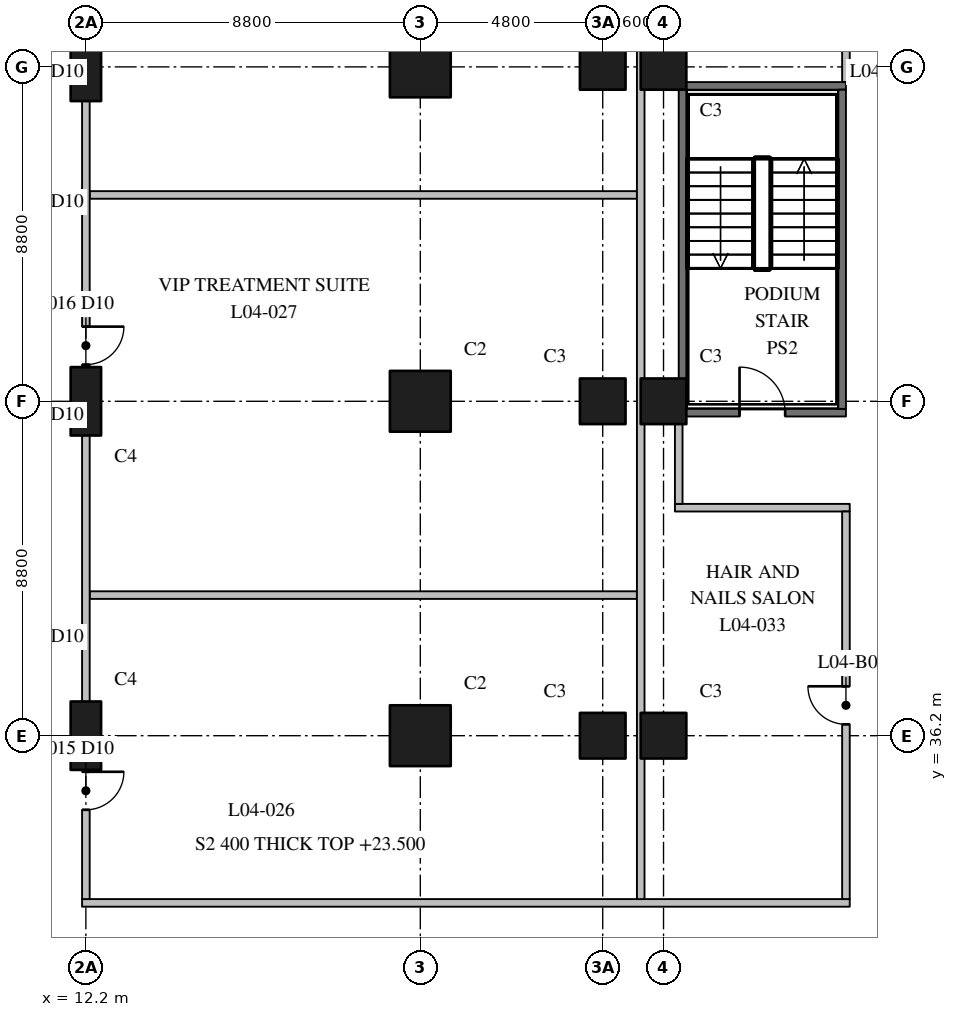
"""IFC4 building model, lengths in metres.
Left out: names, types, materials, properties, quantities, classifications, styles, units other than length and angle.
Written with IfcOpenShell. Run it as: python <this file> out.ifc"""

import sys

from ifc_helpers import new_model, si_unit, direction, frame, frame_2d, origin, origin_2d, place, context, subcontext, project, spatial, rectangle, extrude, element, fill, save


model = new_model("IFC4")
c1 = context("Model", 3, precision=1e-05, world=origin(), true_north=direction((0.0, 1.0)))
c2 = subcontext(c1, "Body", "Model", "MODEL_VIEW")
j1 = project(units=[si_unit("LENGTHUNIT", "METRE"), si_unit("PLANEANGLEUNIT", "RADIAN")], contexts=[c1])
p1 = place(None, origin())
s1 = spatial("IfcSite", under=j1, at=p1, CompositionType="ELEMENT")
p2 = place(p1, origin())
s2 = spatial("IfcBuilding", under=s1, at=p2, CompositionType="ELEMENT")
p3 = place(p2, frame((0.0, 0.0, 23.5)))
s3 = spatial("IfcBuildingStorey", under=s2, at=p3, CompositionType="ELEMENT", Elevation=23.5)
for number, where, z_axis, x_axis in (
    (1, (12.2, 36.2, 0.0), (0.0, 0.0, 1.0), (0.0, 1.0, 0.0)),
    (2, (12.2, 45.0, 0.0), (0.0, 0.0, 1.0), (0.0, 1.0, 0.0)),
    (3, (12.2, 53.8, 0.0), (0.0, 0.0, 1.0), (0.0, 1.0, 0.0)),
):
    element("IfcColumn", number, at=place(p3, frame(where, z_axis=z_axis, x_axis=x_axis)), inside=s3, PredefinedType="COLUMN", context=c2, shape_type="SweptSolid", body=[
        extrude(rectangle(XDim=1.8, YDim=0.8, at=origin_2d()), origin(), (0.0, 0.0, 1.0), 5.5),
    ])
for number, where, z_axis, x_axis in (
    (4, (21.0, 36.2, 0.0), (0.0, 0.0, 1.0), (1.0, 0.0, 0.0)),
    (5, (21.0, 45.0, 0.0), (0.0, 0.0, 1.0), (1.0, 0.0, 0.0)),
    (6, (21.0, 53.8, 0.0), (0.0, 0.0, 1.0), (1.0, 0.0, 0.0)),
):
    element("IfcColumn", number, at=place(p3, frame(where, z_axis=z_axis, x_axis=x_axis)), inside=s3, PredefinedType="COLUMN", context=c2, shape_type="SweptSolid", body=[
        extrude(rectangle(XDim=1.6, YDim=1.6, at=origin_2d()), origin(), (0.0, 0.0, 1.0), 5.5),
    ])
for number, where, z_axis, x_axis in (
    (7, (25.8, 36.2, 0.0), (0.0, 0.0, 1.0), (1.0, 0.0, 0.0)),
    (8, (25.8, 45.0, 0.0), (0.0, 0.0, 1.0), (1.0, 0.0, 0.0)),
    (9, (25.8, 53.8, 0.0), (0.0, 0.0, 1.0), (1.0, 0.0, 0.0)),
    (10, (27.4, 36.2, 0.0), (0.0, 0.0, 1.0), (1.0, 0.0, 0.0)),
    (11, (27.4, 45.0, 0.0), (0.0, 0.0, 1.0), (1.0, 0.0, 0.0)),
    (12, (27.4, 53.8, 0.0), (0.0, 0.0, 1.0), (1.0, 0.0, 0.0)),
):
    element("IfcColumn", number, at=place(p3, frame(where, z_axis=z_axis, x_axis=x_axis)), inside=s3, PredefinedType="COLUMN", context=c2, shape_type="SweptSolid", body=[
        extrude(rectangle(XDim=1.2, YDim=1.2, at=origin_2d()), origin(), (0.0, 0.0, 1.0), 5.5),
    ])
p4 = place(p3, frame((27.8, 44.7, 0.0), z_axis=(0.0, 0.0, 1.0), x_axis=(1.0, 0.0, 0.0)))
e13 = element("IfcWall", 13, at=p4, inside=s3, PredefinedType="SHEAR", context=c2, shape_type="SweptSolid", body=[
    extrude(rectangle(XDim=4.4, YDim=0.2, at=frame_2d((2.2, 0.0))), origin(), (0.0, 0.0, 1.0), 5.1),
])
p5 = place(p4, frame((1.6, 0.0, 0.0)))
e14 = element("IfcOpeningElement", 14, at=p5, cuts=e13, PredefinedType="OPENING", context=c2, shape_type="SweptSolid", body=[
    extrude(rectangle(XDim=1.2, YDim=2.1, at=frame_2d((0.6, 1.05))), frame((0.0, 0.11, 0.0), z_axis=(0.0, -1.0, 0.0), x_axis=(1.0, 0.0, 0.0)), (0.0, 0.0, 1.0), 0.22),
])
p6 = place(p3, frame((27.8, 53.3, 0.0), z_axis=(0.0, 0.0, 1.0), x_axis=(1.0, 0.0, 0.0)))
e15 = element("IfcWall", 15, at=p6, inside=s3, PredefinedType="SHEAR", context=c2, shape_type="SweptSolid", body=[
    extrude(rectangle(XDim=4.4, YDim=0.2, at=frame_2d((2.2, 0.0))), origin(), (0.0, 0.0, 1.0), 5.1),
])
for number, where, z_axis, x_axis in (
    (16, (27.9, 44.8, 0.0), (0.0, 0.0, 1.0), (0.0, 1.0, 0.0)),
    (17, (32.1, 44.8, 0.0), (0.0, 0.0, 1.0), (0.0, 1.0, 0.0)),
):
    element("IfcWall", number, at=place(p3, frame(where, z_axis=z_axis, x_axis=x_axis)), inside=s3, PredefinedType="SHEAR", context=c2, shape_type="SweptSolid", body=[
        extrude(rectangle(XDim=8.4, YDim=0.2, at=frame_2d((4.2, 0.0))), origin(), (0.0, 0.0, 1.0), 5.1),
    ])
p7 = place(p3, frame((12.1, 31.8, 0.0), z_axis=(0.0, 0.0, 1.0), x_axis=(1.0, 0.0, 0.0)))
e18 = element("IfcWall", 18, at=p7, inside=s3, PredefinedType="PARTITIONING", context=c2, shape_type="SweptSolid", body=[
    extrude(rectangle(XDim=20.2, YDim=0.2, at=frame_2d((10.1, 0.0))), origin(), (0.0, 0.0, 1.0), 5.1),
])
p8 = place(p3, frame((27.7, 42.2, 0.0), z_axis=(0.0, 0.0, 1.0), x_axis=(1.0, 0.0, 0.0)))
e19 = element("IfcWall", 19, at=p8, inside=s3, PredefinedType="PARTITIONING", context=c2, shape_type="SweptSolid", body=[
    extrude(rectangle(XDim=4.6, YDim=0.2, at=frame_2d((2.3, 0.0))), origin(), (0.0, 0.0, 1.0), 5.1),
])
for number, where, z_axis, x_axis in (
    (20, (12.3, 39.9, 0.0), (0.0, 0.0, 1.0), (1.0, 0.0, 0.0)),
    (21, (12.3, 50.43, 0.0), (0.0, 0.0, 1.0), (1.0, 0.0, 0.0)),
):
    element("IfcWall", number, at=place(p3, frame(where, z_axis=z_axis, x_axis=x_axis)), inside=s3, PredefinedType="PARTITIONING", context=c2, shape_type="SweptSolid", body=[
        extrude(rectangle(XDim=14.4, YDim=0.2, at=frame_2d((7.2, 0.0))), origin(), (0.0, 0.0, 1.0), 5.1),
    ])
p9 = place(p3, frame((12.2, 31.9, 0.0), z_axis=(0.0, 0.0, 1.0), x_axis=(0.0, 1.0, 0.0)))
e22 = element("IfcWall", 22, at=p9, inside=s3, PredefinedType="PARTITIONING", context=c2, shape_type="SweptSolid", body=[
    extrude(rectangle(XDim=46.3, YDim=0.2, at=frame_2d((23.15, 0.0))), origin(), (0.0, 0.0, 1.0), 5.1),
])
p10 = place(p9, frame((2.35, 0.0, 0.0)))
e23 = element("IfcOpeningElement", 23, at=p10, cuts=e22, PredefinedType="OPENING", context=c2, shape_type="SweptSolid", body=[
    extrude(rectangle(XDim=1.0, YDim=2.1, at=frame_2d((0.5, 1.05))), frame((0.0, 0.11, 0.0), z_axis=(0.0, -1.0, 0.0), x_axis=(1.0, 0.0, 0.0)), (0.0, 0.0, 1.0), 0.22),
])
p11 = place(p9, frame((14.065, 0.0, 0.0)))
e24 = element("IfcOpeningElement", 24, at=p11, cuts=e22, PredefinedType="OPENING", context=c2, shape_type="SweptSolid", body=[
    extrude(rectangle(XDim=1.0, YDim=2.1, at=frame_2d((0.5, 1.05))), frame((0.0, 0.11, 0.0), z_axis=(0.0, -1.0, 0.0), x_axis=(1.0, 0.0, 0.0)), (0.0, 0.0, 1.0), 0.22),
])
p12 = place(p9, frame((22.84, 0.0, 0.0)))
e25 = element("IfcOpeningElement", 25, at=p12, cuts=e22, PredefinedType="OPENING", context=c2, shape_type="SweptSolid", body=[
    extrude(rectangle(XDim=1.8, YDim=2.4, at=frame_2d((0.9, 1.2))), frame((0.0, 0.11, 0.0), z_axis=(0.0, -1.0, 0.0), x_axis=(1.0, 0.0, 0.0)), (0.0, 0.0, 1.0), 0.22),
])
p13 = place(p9, frame((27.94, 0.0, 0.0)))
e26 = element("IfcOpeningElement", 26, at=p13, cuts=e22, PredefinedType="OPENING", context=c2, shape_type="SweptSolid", body=[
    extrude(rectangle(XDim=1.8, YDim=2.4, at=frame_2d((0.9, 1.2))), frame((0.0, 0.11, 0.0), z_axis=(0.0, -1.0, 0.0), x_axis=(1.0, 0.0, 0.0)), (0.0, 0.0, 1.0), 0.22),
])
p14 = place(p9, frame((37.565, 0.0, 0.0)))
e27 = element("IfcOpeningElement", 27, at=p14, cuts=e22, PredefinedType="OPENING", context=c2, shape_type="SweptSolid", body=[
    extrude(rectangle(XDim=1.0, YDim=2.1, at=frame_2d((0.5, 1.05))), frame((0.0, 0.11, 0.0), z_axis=(0.0, -1.0, 0.0), x_axis=(1.0, 0.0, 0.0)), (0.0, 0.0, 1.0), 0.22),
])
p15 = place(p9, frame((42.85, 0.0, 0.0)))
e28 = element("IfcOpeningElement", 28, at=p15, cuts=e22, PredefinedType="OPENING", context=c2, shape_type="SweptSolid", body=[
    extrude(rectangle(XDim=1.8, YDim=2.1, at=frame_2d((0.9, 1.05))), frame((0.0, 0.11, 0.0), z_axis=(0.0, -1.0, 0.0), x_axis=(1.0, 0.0, 0.0)), (0.0, 0.0, 1.0), 0.22),
])
p16 = place(p3, frame((32.2, 31.9, 0.0), z_axis=(0.0, 0.0, 1.0), x_axis=(0.0, 1.0, 0.0)))
e29 = element("IfcWall", 29, at=p16, inside=s3, PredefinedType="PARTITIONING", context=c2, shape_type="SweptSolid", body=[
    extrude(rectangle(XDim=10.2, YDim=0.2, at=frame_2d((5.1, 0.0))), origin(), (0.0, 0.0, 1.0), 5.1),
])
p17 = place(p16, frame((4.6, 0.0, 0.0)))
e30 = element("IfcOpeningElement", 30, at=p17, cuts=e29, PredefinedType="OPENING", context=c2, shape_type="SweptSolid", body=[
    extrude(rectangle(XDim=1.0, YDim=2.1, at=frame_2d((0.5, 1.05))), frame((0.0, 0.11, 0.0), z_axis=(0.0, -1.0, 0.0), x_axis=(1.0, 0.0, 0.0)), (0.0, 0.0, 1.0), 0.22),
])
p18 = place(p3, frame((32.2, 53.4, 0.0), z_axis=(0.0, 0.0, 1.0), x_axis=(0.0, 1.0, 0.0)))
e31 = element("IfcWall", 31, at=p18, inside=s3, PredefinedType="PARTITIONING", context=c2, shape_type="SweptSolid", body=[
    extrude(rectangle(XDim=1.2, YDim=0.2, at=frame_2d((0.6, 0.0))), origin(), (0.0, 0.0, 1.0), 5.1),
])
p19 = place(p3, frame((27.8, 42.3, 0.0), z_axis=(0.0, 0.0, 1.0), x_axis=(0.0, 1.0, 0.0)))
e32 = element("IfcWall", 32, at=p19, inside=s3, PredefinedType="PARTITIONING", context=c2, shape_type="SweptSolid", body=[
    extrude(rectangle(XDim=2.3, YDim=0.2, at=frame_2d((1.15, 0.0))), origin(), (0.0, 0.0, 1.0), 5.1),
])
p20 = place(p3, frame((26.8, 31.9, 0.0), z_axis=(0.0, 0.0, 1.0), x_axis=(0.0, 1.0, 0.0)))
e33 = element("IfcWall", 33, at=p20, inside=s3, PredefinedType="PARTITIONING", context=c2, shape_type="SweptSolid", body=[
    extrude(rectangle(XDim=22.7, YDim=0.2, at=frame_2d((11.35, 0.0))), origin(), (0.0, 0.0, 1.0), 5.1),
])
p21 = place(p5, origin())
e34 = element("IfcDoor", 34, at=p21, inside=s3, OperationType="SINGLE_SWING_LEFT", PredefinedType="DOOR", context=c2, shape_type="SweptSolid", body=[
    extrude(rectangle(XDim=1.2, YDim=2.1, at=frame_2d((0.6, 1.05))), frame((0.0, 0.025, 0.0), z_axis=(0.0, -1.0, 0.0), x_axis=(1.0, 0.0, 0.0)), (0.0, 0.0, 1.0), 0.05),
])
fill(e14, e34)
p22 = place(p10, frame((1.0, 0.0, 0.0), z_axis=(0.0, 0.0, 1.0), x_axis=(-1.0, 0.0, 0.0)))
e35 = element("IfcDoor", 35, at=p22, inside=s3, OperationType="SINGLE_SWING_RIGHT", PredefinedType="DOOR", context=c2, shape_type="SweptSolid", body=[
    extrude(rectangle(XDim=1.0, YDim=2.1, at=frame_2d((0.5, 1.05))), frame((0.0, 0.025, 0.0), z_axis=(0.0, -1.0, 0.0), x_axis=(1.0, 0.0, 0.0)), (0.0, 0.0, 1.0), 0.05),
])
fill(e23, e35)
p23 = place(p11, frame((1.0, 0.0, 0.0), z_axis=(0.0, 0.0, 1.0), x_axis=(-1.0, 0.0, 0.0)))
e36 = element("IfcDoor", 36, at=p23, inside=s3, OperationType="SINGLE_SWING_RIGHT", PredefinedType="DOOR", context=c2, shape_type="SweptSolid", body=[
    extrude(rectangle(XDim=1.0, YDim=2.1, at=frame_2d((0.5, 1.05))), frame((0.0, 0.025, 0.0), z_axis=(0.0, -1.0, 0.0), x_axis=(1.0, 0.0, 0.0)), (0.0, 0.0, 1.0), 0.05),
])
fill(e24, e36)
p24 = place(p17, origin())
e37 = element("IfcDoor", 37, at=p24, inside=s3, OperationType="SINGLE_SWING_RIGHT", PredefinedType="DOOR", context=c2, shape_type="SweptSolid", body=[
    extrude(rectangle(XDim=1.0, YDim=2.1, at=frame_2d((0.5, 1.05))), frame((0.0, 0.025, 0.0), z_axis=(0.0, -1.0, 0.0), x_axis=(1.0, 0.0, 0.0)), (0.0, 0.0, 1.0), 0.05),
])
fill(e30, e37)
save(model, sys.argv[1])
